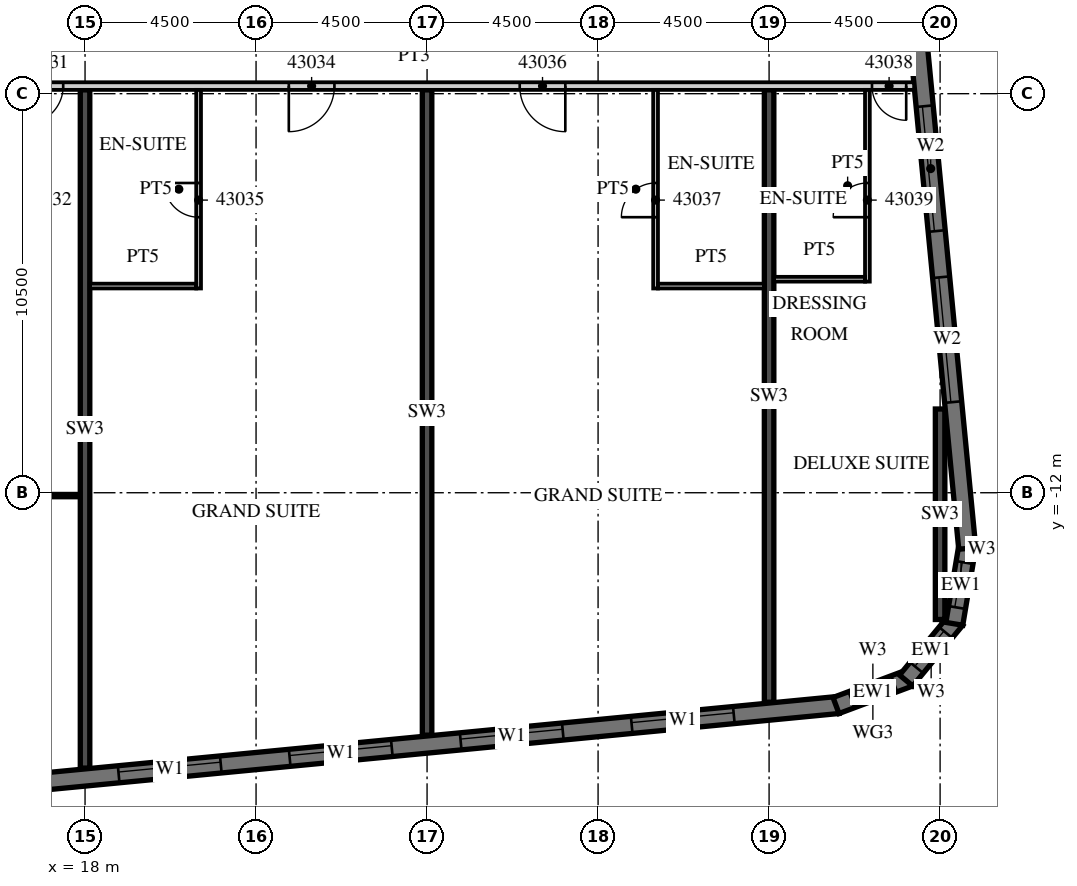
"""IFC4 building model, lengths in metres.
Left out: names, types, materials, properties, quantities, classifications, styles, units other than length and angle.
Written with IfcOpenShell. Run it as: python <this file> out.ifc"""

import sys

from ifc_helpers import new_model, si_unit, direction, frame, frame_2d, origin, place, context, subcontext, project, spatial, polyline, rectangle, outline, extrude, element, fill, save


model = new_model("IFC4")
c1 = context("Model", 3, precision=1e-05, world=origin(), true_north=direction((0.0, 1.0)))
c2 = subcontext(c1, "Body", "Model", "MODEL_VIEW")
j1 = project(units=[si_unit("LENGTHUNIT", "METRE"), si_unit("PLANEANGLEUNIT", "RADIAN")], contexts=[c1])
p1 = place(None, origin())
s1 = spatial("IfcSite", under=j1, at=p1, CompositionType="ELEMENT")
p2 = place(p1, origin())
s2 = spatial("IfcBuilding", under=s1, at=p2, CompositionType="ELEMENT")
p3 = place(p2, frame((0.0, 0.0, 183.4)))
s3 = spatial("IfcBuildingStorey", under=s2, at=p3, CompositionType="ELEMENT", Elevation=183.4)
p4 = place(p3, frame((18.0, -19.245, 0.0), z_axis=(0.0, 0.0, 1.0), x_axis=(0.0, 1.0, 0.0)))
e1 = element("IfcWall", 1, at=p4, inside=s3, PredefinedType="SHEAR", context=c2, shape_type="SweptSolid", body=[
    extrude(rectangle(XDim=17.845, YDim=0.25, at=frame_2d((8.923, 0.0))), origin(), (0.0, 0.0, 1.0), 3.3),
])
p5 = place(p3, frame((27.0, -18.379, 0.0), z_axis=(0.0, 0.0, 1.0), x_axis=(0.0, 1.0, 0.0)))
e2 = element("IfcWall", 2, at=p5, inside=s3, PredefinedType="SHEAR", context=c2, shape_type="SweptSolid", body=[
    extrude(rectangle(XDim=16.979, YDim=0.25, at=frame_2d((8.489, 0.0))), origin(), (0.0, 0.0, 1.0), 3.3),
])
p6 = place(p3, frame((36.0, -17.512, 0.0), z_axis=(0.0, 0.0, 1.0), x_axis=(0.0, 1.0, 0.0)))
e3 = element("IfcWall", 3, at=p6, inside=s3, PredefinedType="SHEAR", context=c2, shape_type="SweptSolid", body=[
    extrude(rectangle(XDim=16.112, YDim=0.25, at=frame_2d((8.056, 0.0))), origin(), (0.0, 0.0, 1.0), 3.3),
])
p7 = place(p3, frame((40.5, -15.335, 0.0), z_axis=(0.0, 0.0, 1.0), x_axis=(0.0, 1.0, 0.0)))
e4 = element("IfcWall", 4, at=p7, inside=s3, PredefinedType="SHEAR", context=c2, shape_type="SweptSolid", body=[
    extrude(rectangle(XDim=5.538, YDim=0.25, at=frame_2d((2.769, 0.0))), origin(), (0.0, 0.0, 1.0), 3.3),
])
p8 = place(p3, frame((-13.521, -22.529, 0.0), z_axis=(0.0, 0.0, 1.0), x_axis=(0.995396436651, 0.095843277819, 0.0)))
e5 = element("IfcWall", 5, at=p8, inside=s3, PredefinedType="SOLIDWALL", context=c2, shape_type="SweptSolid", body=[
    extrude(rectangle(XDim=51.578, YDim=0.45, at=frame_2d((25.789, 0.0))), origin(), (0.0, 0.0, 1.0), 3.02),
])
p9 = place(p8, frame((0.91, 0.0, 0.45)))
e6 = element("IfcOpeningElement", 6, at=p9, cuts=e5, PredefinedType="OPENING", context=c2, shape_type="SweptSolid", body=[
    extrude(rectangle(XDim=2.7, YDim=2.25, at=frame_2d((1.35, 1.125))), frame((0.0, 0.235, 0.0), z_axis=(0.0, -1.0, 0.0), x_axis=(1.0, 0.0, 0.0)), (0.0, 0.0, 1.0), 0.47),
])
p10 = place(p8, frame((5.431, 0.0, 0.45)))
e7 = element("IfcOpeningElement", 7, at=p10, cuts=e5, PredefinedType="OPENING", context=c2, shape_type="SweptSolid", body=[
    extrude(rectangle(XDim=2.7, YDim=2.25, at=frame_2d((1.35, 1.125))), frame((0.0, 0.235, 0.0), z_axis=(0.0, -1.0, 0.0), x_axis=(1.0, 0.0, 0.0)), (0.0, 0.0, 1.0), 0.47),
])
p11 = place(p8, frame((9.952, 0.0, 0.45)))
e8 = element("IfcOpeningElement", 8, at=p11, cuts=e5, PredefinedType="OPENING", context=c2, shape_type="SweptSolid", body=[
    extrude(rectangle(XDim=2.7, YDim=2.25, at=frame_2d((1.35, 1.125))), frame((0.0, 0.235, 0.0), z_axis=(0.0, -1.0, 0.0), x_axis=(1.0, 0.0, 0.0)), (0.0, 0.0, 1.0), 0.47),
])
p12 = place(p8, frame((14.473, 0.0, 0.45)))
e9 = element("IfcOpeningElement", 9, at=p12, cuts=e5, PredefinedType="OPENING", context=c2, shape_type="SweptSolid", body=[
    extrude(rectangle(XDim=2.7, YDim=2.25, at=frame_2d((1.35, 1.125))), frame((0.0, 0.235, 0.0), z_axis=(0.0, -1.0, 0.0), x_axis=(1.0, 0.0, 0.0)), (0.0, 0.0, 1.0), 0.47),
])
p13 = place(p8, frame((18.994, 0.0, 0.45)))
e10 = element("IfcOpeningElement", 10, at=p13, cuts=e5, PredefinedType="OPENING", context=c2, shape_type="SweptSolid", body=[
    extrude(rectangle(XDim=2.7, YDim=2.25, at=frame_2d((1.35, 1.125))), frame((0.0, 0.235, 0.0), z_axis=(0.0, -1.0, 0.0), x_axis=(1.0, 0.0, 0.0)), (0.0, 0.0, 1.0), 0.47),
])
p14 = place(p8, frame((23.514, 0.0, 0.45)))
e11 = element("IfcOpeningElement", 11, at=p14, cuts=e5, PredefinedType="OPENING", context=c2, shape_type="SweptSolid", body=[
    extrude(rectangle(XDim=2.7, YDim=2.25, at=frame_2d((1.35, 1.125))), frame((0.0, 0.235, 0.0), z_axis=(0.0, -1.0, 0.0), x_axis=(1.0, 0.0, 0.0)), (0.0, 0.0, 1.0), 0.47),
])
p15 = place(p8, frame((28.035, 0.0, 0.45)))
e12 = element("IfcOpeningElement", 12, at=p15, cuts=e5, PredefinedType="OPENING", context=c2, shape_type="SweptSolid", body=[
    extrude(rectangle(XDim=2.7, YDim=2.25, at=frame_2d((1.35, 1.125))), frame((0.0, 0.235, 0.0), z_axis=(0.0, -1.0, 0.0), x_axis=(1.0, 0.0, 0.0)), (0.0, 0.0, 1.0), 0.47),
])
p16 = place(p8, frame((32.556, 0.0, 0.45)))
e13 = element("IfcOpeningElement", 13, at=p16, cuts=e5, PredefinedType="OPENING", context=c2, shape_type="SweptSolid", body=[
    extrude(rectangle(XDim=2.7, YDim=2.25, at=frame_2d((1.35, 1.125))), frame((0.0, 0.235, 0.0), z_axis=(0.0, -1.0, 0.0), x_axis=(1.0, 0.0, 0.0)), (0.0, 0.0, 1.0), 0.47),
])
p17 = place(p8, frame((37.077, 0.0, 0.45)))
e14 = element("IfcOpeningElement", 14, at=p17, cuts=e5, PredefinedType="OPENING", context=c2, shape_type="SweptSolid", body=[
    extrude(rectangle(XDim=2.7, YDim=2.25, at=frame_2d((1.35, 1.125))), frame((0.0, 0.235, 0.0), z_axis=(0.0, -1.0, 0.0), x_axis=(1.0, 0.0, 0.0)), (0.0, 0.0, 1.0), 0.47),
])
p18 = place(p8, frame((41.598, 0.0, 0.45)))
e15 = element("IfcOpeningElement", 15, at=p18, cuts=e5, PredefinedType="OPENING", context=c2, shape_type="SweptSolid", body=[
    extrude(rectangle(XDim=2.7, YDim=2.25, at=frame_2d((1.35, 1.125))), frame((0.0, 0.235, 0.0), z_axis=(0.0, -1.0, 0.0), x_axis=(1.0, 0.0, 0.0)), (0.0, 0.0, 1.0), 0.47),
])
p19 = place(p8, frame((46.119, 0.0, 0.45)))
e16 = element("IfcOpeningElement", 16, at=p19, cuts=e5, PredefinedType="OPENING", context=c2, shape_type="SweptSolid", body=[
    extrude(rectangle(XDim=2.7, YDim=2.25, at=frame_2d((1.35, 1.125))), frame((0.0, 0.235, 0.0), z_axis=(0.0, -1.0, 0.0), x_axis=(1.0, 0.0, 0.0)), (0.0, 0.0, 1.0), 0.47),
])
p20 = place(p3, frame((37.761, -17.598, 0.0), z_axis=(0.0, 0.0, 1.0), x_axis=(0.936677599948, 0.350192909346, 0.0)))
e17 = element("IfcWall", 17, at=p20, inside=s3, PredefinedType="SOLIDWALL", context=c2, shape_type="SweptSolid", body=[
    extrude(outline(polyline([(0.0, -0.225), (2.071, -0.225), (1.95, 0.225), (0.121, 0.225), (0.0, -0.225)])), origin(), (0.0, 0.0, 1.0), 3.02),
])
p21 = place(p20, frame((0.435, 0.0, 0.45)))
e18 = element("IfcOpeningElement", 18, at=p21, cuts=e17, PredefinedType="OPENING", context=c2, shape_type="SweptSolid", body=[
    extrude(rectangle(XDim=1.2, YDim=2.25, at=frame_2d((0.6, 1.125))), frame((0.0, 0.235, 0.0), z_axis=(0.0, -1.0, 0.0), x_axis=(1.0, 0.0, 0.0)), (0.0, 0.0, 1.0), 0.47),
])
p22 = place(p3, frame((39.606, -16.941, 0.0), z_axis=(0.0, 0.0, 1.0), x_axis=(0.636116318187, 0.771593176315, 0.0)))
e19 = element("IfcWall", 19, at=p22, inside=s3, PredefinedType="SOLIDWALL", context=c2, shape_type="SweptSolid", body=[
    extrude(outline(polyline([(0.0, -0.225), (2.071, -0.225), (1.95, 0.225), (0.121, 0.225), (0.0, -0.225)])), origin(), (0.0, 0.0, 1.0), 3.02),
])
p23 = place(p22, frame((0.435, 0.0, 0.45)))
e20 = element("IfcOpeningElement", 20, at=p23, cuts=e19, PredefinedType="OPENING", context=c2, shape_type="SweptSolid", body=[
    extrude(rectangle(XDim=1.2, YDim=2.25, at=frame_2d((0.6, 1.125))), frame((0.0, 0.235, 0.0), z_axis=(0.0, -1.0, 0.0), x_axis=(1.0, 0.0, 0.0)), (0.0, 0.0, 1.0), 0.47),
])
p24 = place(p3, frame((40.875, -15.449, 0.0), z_axis=(0.0, 0.0, 1.0), x_axis=(0.164953448126, 0.986301353518, 0.0)))
e21 = element("IfcWall", 21, at=p24, inside=s3, PredefinedType="SOLIDWALL", context=c2, shape_type="SweptSolid", body=[
    extrude(outline(polyline([(0.0, -0.225), (2.071, -0.225), (1.95, 0.225), (0.121, 0.225), (0.0, -0.225)])), origin(), (0.0, 0.0, 1.0), 3.02),
])
p25 = place(p24, frame((0.435, 0.0, 0.45)))
e22 = element("IfcOpeningElement", 22, at=p25, cuts=e21, PredefinedType="OPENING", context=c2, shape_type="SweptSolid", body=[
    extrude(rectangle(XDim=1.2, YDim=2.25, at=frame_2d((0.6, 1.125))), frame((0.0, 0.235, 0.0), z_axis=(0.0, -1.0, 0.0), x_axis=(1.0, 0.0, 0.0)), (0.0, 0.0, 1.0), 0.47),
])
p26 = place(p3, frame((41.214, -13.466, 0.0), z_axis=(0.0, 0.0, 1.0), x_axis=(-0.095847314626, 0.995396047952, 0.0)))
e23 = element("IfcWall", 23, at=p26, inside=s3, PredefinedType="SOLIDWALL", context=c2, shape_type="SweptSolid", body=[
    extrude(rectangle(XDim=34.0, YDim=0.45, at=frame_2d((17.0, 0.0))), origin(), (0.0, 0.0, 1.0), 3.02),
])
p27 = place(p26, frame((3.869, 0.0, 0.45)))
e24 = element("IfcOpeningElement", 24, at=p27, cuts=e23, PredefinedType="OPENING", context=c2, shape_type="SweptSolid", body=[
    extrude(rectangle(XDim=3.3, YDim=2.25, at=frame_2d((1.65, 1.125))), frame((0.0, 0.235, 0.0), z_axis=(0.0, -1.0, 0.0), x_axis=(1.0, 0.0, 0.0)), (0.0, 0.0, 1.0), 0.47),
])
p28 = place(p26, frame((8.39, 0.0, 0.45)))
e25 = element("IfcOpeningElement", 25, at=p28, cuts=e23, PredefinedType="OPENING", context=c2, shape_type="SweptSolid", body=[
    extrude(rectangle(XDim=3.3, YDim=2.25, at=frame_2d((1.65, 1.125))), frame((0.0, 0.235, 0.0), z_axis=(0.0, -1.0, 0.0), x_axis=(1.0, 0.0, 0.0)), (0.0, 0.0, 1.0), 0.47),
])
p29 = place(p3, frame((13.5, -1.3, 0.0), z_axis=(0.0, 0.0, 1.0), x_axis=(1.0, 0.0, 0.0)))
e26 = element("IfcWall", 26, at=p29, inside=s3, PredefinedType="PARTITIONING", context=c2, shape_type="SweptSolid", body=[
    extrude(rectangle(XDim=26.317, YDim=0.2, at=frame_2d((13.158, 0.0))), origin(), (0.0, 0.0, 1.0), 3.02),
])
p30 = place(p29, frame((2.925, 0.0, 0.0)))
e27 = element("IfcOpeningElement", 27, at=p30, cuts=e26, PredefinedType="OPENING", context=c2, shape_type="SweptSolid", body=[
    extrude(rectangle(XDim=1.0, YDim=2.1, at=frame_2d((0.5, 1.05))), frame((0.0, 0.11, 0.0), z_axis=(0.0, -1.0, 0.0), x_axis=(1.0, 0.0, 0.0)), (0.0, 0.0, 1.0), 0.22),
])
p31 = place(p29, frame((9.862, 0.0, 0.0)))
e28 = element("IfcOpeningElement", 28, at=p31, cuts=e26, PredefinedType="OPENING", context=c2, shape_type="SweptSolid", body=[
    extrude(rectangle(XDim=1.2, YDim=2.1, at=frame_2d((0.6, 1.05))), frame((0.0, 0.11, 0.0), z_axis=(0.0, -1.0, 0.0), x_axis=(1.0, 0.0, 0.0)), (0.0, 0.0, 1.0), 0.22),
])
p32 = place(p29, frame((15.938, 0.0, 0.0)))
e29 = element("IfcOpeningElement", 29, at=p32, cuts=e26, PredefinedType="OPENING", context=c2, shape_type="SweptSolid", body=[
    extrude(rectangle(XDim=1.2, YDim=2.1, at=frame_2d((0.6, 1.05))), frame((0.0, 0.11, 0.0), z_axis=(0.0, -1.0, 0.0), x_axis=(1.0, 0.0, 0.0)), (0.0, 0.0, 1.0), 0.22),
])
p33 = place(p29, frame((25.208, 0.0, 0.0)))
e30 = element("IfcOpeningElement", 30, at=p33, cuts=e26, PredefinedType="OPENING", context=c2, shape_type="SweptSolid", body=[
    extrude(rectangle(XDim=0.9, YDim=2.1, at=frame_2d((0.45, 1.05))), frame((0.0, 0.11, 0.0), z_axis=(0.0, -1.0, 0.0), x_axis=(1.0, 0.0, 0.0)), (0.0, 0.0, 1.0), 0.22),
])
p34 = place(p3, frame((13.6, -12.075, 0.0), z_axis=(0.0, 0.0, 1.0), x_axis=(1.0, 0.0, 0.0)))
e31 = element("IfcWall", 31, at=p34, inside=s3, PredefinedType="PARTITIONING", context=c2, shape_type="SweptSolid", body=[
    extrude(rectangle(XDim=4.275, YDim=0.1, at=frame_2d((2.137, 0.0))), origin(), (0.0, 0.0, 1.0), 3.02),
])
p35 = place(p34, frame((1.388, 0.0, 0.0)))
e32 = element("IfcOpeningElement", 32, at=p35, cuts=e31, PredefinedType="OPENING", context=c2, shape_type="SweptSolid", body=[
    extrude(rectangle(XDim=1.5, YDim=2.1, at=frame_2d((0.75, 1.05))), frame((0.0, 0.06, 0.0), z_axis=(0.0, -1.0, 0.0), x_axis=(1.0, 0.0, 0.0)), (0.0, 0.0, 1.0), 0.12),
])
p36 = place(p3, frame((20.988, -6.625, 0.0), z_axis=(0.0, 0.0, 1.0), x_axis=(0.0, 1.0, 0.0)))
e33 = element("IfcWall", 33, at=p36, inside=s3, PredefinedType="PARTITIONING", context=c2, shape_type="SweptSolid", body=[
    extrude(rectangle(XDim=5.225, YDim=0.125, at=frame_2d((2.613, 0.0))), origin(), (0.0, 0.0, 1.0), 3.02),
])
p37 = place(p36, frame((1.875, 0.0, 0.0)))
e34 = element("IfcOpeningElement", 34, at=p37, cuts=e33, PredefinedType="OPENING", context=c2, shape_type="SweptSolid", body=[
    extrude(rectangle(XDim=0.9, YDim=2.1, at=frame_2d((0.45, 1.05))), frame((0.0, 0.073, 0.0), z_axis=(0.0, -1.0, 0.0), x_axis=(1.0, 0.0, 0.0)), (0.0, 0.0, 1.0), 0.145),
])
p38 = place(p3, frame((18.125, -6.562, 0.0), z_axis=(0.0, 0.0, 1.0), x_axis=(1.0, 0.0, 0.0)))
e35 = element("IfcWall", 35, at=p38, inside=s3, PredefinedType="PARTITIONING", context=c2, shape_type="SweptSolid", body=[
    extrude(rectangle(XDim=2.8, YDim=0.125, at=frame_2d((1.4, 0.0))), origin(), (0.0, 0.0, 1.0), 3.02),
])
p39 = place(p3, frame((33.013, -6.625, 0.0), z_axis=(0.0, 0.0, 1.0), x_axis=(0.0, 1.0, 0.0)))
e36 = element("IfcWall", 36, at=p39, inside=s3, PredefinedType="PARTITIONING", context=c2, shape_type="SweptSolid", body=[
    extrude(rectangle(XDim=5.225, YDim=0.125, at=frame_2d((2.613, 0.0))), origin(), (0.0, 0.0, 1.0), 3.02),
])
p40 = place(p39, frame((1.875, 0.0, 0.0)))
e37 = element("IfcOpeningElement", 37, at=p40, cuts=e36, PredefinedType="OPENING", context=c2, shape_type="SweptSolid", body=[
    extrude(rectangle(XDim=0.9, YDim=2.1, at=frame_2d((0.45, 1.05))), frame((0.0, 0.073, 0.0), z_axis=(0.0, -1.0, 0.0), x_axis=(1.0, 0.0, 0.0)), (0.0, 0.0, 1.0), 0.145),
])
p41 = place(p3, frame((33.075, -6.562, 0.0), z_axis=(0.0, 0.0, 1.0), x_axis=(1.0, 0.0, 0.0)))
e38 = element("IfcWall", 38, at=p41, inside=s3, PredefinedType="PARTITIONING", context=c2, shape_type="SweptSolid", body=[
    extrude(rectangle(XDim=2.8, YDim=0.125, at=frame_2d((1.4, 0.0))), origin(), (0.0, 0.0, 1.0), 3.02),
])
p42 = place(p3, frame((38.587, -6.445, 0.0), z_axis=(0.0, 0.0, 1.0), x_axis=(0.0, 1.0, 0.0)))
e39 = element("IfcWall", 39, at=p42, inside=s3, PredefinedType="PARTITIONING", context=c2, shape_type="SweptSolid", body=[
    extrude(rectangle(XDim=5.045, YDim=0.125, at=frame_2d((2.522, 0.0))), origin(), (0.0, 0.0, 1.0), 3.02),
])
p43 = place(p42, frame((1.695, 0.0, 0.0)))
e40 = element("IfcOpeningElement", 40, at=p43, cuts=e39, PredefinedType="OPENING", context=c2, shape_type="SweptSolid", body=[
    extrude(rectangle(XDim=0.9, YDim=2.1, at=frame_2d((0.45, 1.05))), frame((0.0, 0.073, 0.0), z_axis=(0.0, -1.0, 0.0), x_axis=(1.0, 0.0, 0.0)), (0.0, 0.0, 1.0), 0.145),
])
p44 = place(p3, frame((36.125, -6.382, 0.0), z_axis=(0.0, 0.0, 1.0), x_axis=(1.0, 0.0, 0.0)))
e41 = element("IfcWall", 41, at=p44, inside=s3, PredefinedType="PARTITIONING", context=c2, shape_type="SweptSolid", body=[
    extrude(rectangle(XDim=2.4, YDim=0.125, at=frame_2d((1.2, 0.0))), origin(), (0.0, 0.0, 1.0), 3.02),
])
p45 = place(p16, origin())
e42 = element("IfcWindow", 42, at=p45, inside=s3, PartitioningType="SINGLE_PANEL", PredefinedType="WINDOW", context=c2, shape_type="SweptSolid", body=[
    extrude(rectangle(XDim=2.7, YDim=2.25, at=frame_2d((1.35, 1.125))), frame((0.0, 0.09, 0.0), z_axis=(0.0, -1.0, 0.0), x_axis=(1.0, 0.0, 0.0)), (0.0, 0.0, 1.0), 0.06),
])
fill(e13, e42)
p46 = place(p17, origin())
e43 = element("IfcWindow", 43, at=p46, inside=s3, PartitioningType="SINGLE_PANEL", PredefinedType="WINDOW", context=c2, shape_type="SweptSolid", body=[
    extrude(rectangle(XDim=2.7, YDim=2.25, at=frame_2d((1.35, 1.125))), frame((0.0, 0.09, 0.0), z_axis=(0.0, -1.0, 0.0), x_axis=(1.0, 0.0, 0.0)), (0.0, 0.0, 1.0), 0.06),
])
fill(e14, e43)
p47 = place(p18, origin())
e44 = element("IfcWindow", 44, at=p47, inside=s3, PartitioningType="SINGLE_PANEL", PredefinedType="WINDOW", context=c2, shape_type="SweptSolid", body=[
    extrude(rectangle(XDim=2.7, YDim=2.25, at=frame_2d((1.35, 1.125))), frame((0.0, 0.09, 0.0), z_axis=(0.0, -1.0, 0.0), x_axis=(1.0, 0.0, 0.0)), (0.0, 0.0, 1.0), 0.06),
])
fill(e15, e44)
p48 = place(p19, origin())
e45 = element("IfcWindow", 45, at=p48, inside=s3, PartitioningType="SINGLE_PANEL", PredefinedType="WINDOW", context=c2, shape_type="SweptSolid", body=[
    extrude(rectangle(XDim=2.7, YDim=2.25, at=frame_2d((1.35, 1.125))), frame((0.0, 0.09, 0.0), z_axis=(0.0, -1.0, 0.0), x_axis=(1.0, 0.0, 0.0)), (0.0, 0.0, 1.0), 0.06),
])
fill(e16, e45)
p49 = place(p21, origin())
e46 = element("IfcWindow", 46, at=p49, inside=s3, PartitioningType="SINGLE_PANEL", PredefinedType="WINDOW", context=c2, shape_type="SweptSolid", body=[
    extrude(rectangle(XDim=1.2, YDim=2.25, at=frame_2d((0.6, 1.125))), frame((0.0, 0.09, 0.0), z_axis=(0.0, -1.0, 0.0), x_axis=(1.0, 0.0, 0.0)), (0.0, 0.0, 1.0), 0.06),
])
fill(e18, e46)
p50 = place(p23, origin())
e47 = element("IfcWindow", 47, at=p50, inside=s3, PartitioningType="SINGLE_PANEL", PredefinedType="WINDOW", context=c2, shape_type="SweptSolid", body=[
    extrude(rectangle(XDim=1.2, YDim=2.25, at=frame_2d((0.6, 1.125))), frame((0.0, 0.09, 0.0), z_axis=(0.0, -1.0, 0.0), x_axis=(1.0, 0.0, 0.0)), (0.0, 0.0, 1.0), 0.06),
])
fill(e20, e47)
p51 = place(p25, origin())
e48 = element("IfcWindow", 48, at=p51, inside=s3, PartitioningType="SINGLE_PANEL", PredefinedType="WINDOW", context=c2, shape_type="SweptSolid", body=[
    extrude(rectangle(XDim=1.2, YDim=2.25, at=frame_2d((0.6, 1.125))), frame((0.0, 0.09, 0.0), z_axis=(0.0, -1.0, 0.0), x_axis=(1.0, 0.0, 0.0)), (0.0, 0.0, 1.0), 0.06),
])
fill(e22, e48)
p52 = place(p27, origin())
e49 = element("IfcWindow", 49, at=p52, inside=s3, PartitioningType="SINGLE_PANEL", PredefinedType="WINDOW", context=c2, shape_type="SweptSolid", body=[
    extrude(rectangle(XDim=3.3, YDim=2.25, at=frame_2d((1.65, 1.125))), frame((0.0, 0.09, 0.0), z_axis=(0.0, -1.0, 0.0), x_axis=(1.0, 0.0, 0.0)), (0.0, 0.0, 1.0), 0.06),
])
fill(e24, e49)
p53 = place(p28, origin())
e50 = element("IfcWindow", 50, at=p53, inside=s3, PartitioningType="SINGLE_PANEL", PredefinedType="WINDOW", context=c2, shape_type="SweptSolid", body=[
    extrude(rectangle(XDim=3.3, YDim=2.25, at=frame_2d((1.65, 1.125))), frame((0.0, 0.09, 0.0), z_axis=(0.0, -1.0, 0.0), x_axis=(1.0, 0.0, 0.0)), (0.0, 0.0, 1.0), 0.06),
])
fill(e25, e50)
p54 = place(p30, origin())
e51 = element("IfcDoor", 51, at=p54, inside=s3, OperationType="SINGLE_SWING_LEFT", PredefinedType="DOOR", context=c2, shape_type="SweptSolid", body=[
    extrude(rectangle(XDim=1.0, YDim=2.1, at=frame_2d((0.5, 1.05))), frame((0.0, 0.025, 0.0), z_axis=(0.0, -1.0, 0.0), x_axis=(1.0, 0.0, 0.0)), (0.0, 0.0, 1.0), 0.05),
])
fill(e27, e51)
p55 = place(p31, origin())
e52 = element("IfcDoor", 52, at=p55, inside=s3, OperationType="SINGLE_SWING_LEFT", PredefinedType="DOOR", context=c2, shape_type="SweptSolid", body=[
    extrude(rectangle(XDim=1.2, YDim=2.1, at=frame_2d((0.6, 1.05))), frame((0.0, 0.025, 0.0), z_axis=(0.0, -1.0, 0.0), x_axis=(1.0, 0.0, 0.0)), (0.0, 0.0, 1.0), 0.05),
])
fill(e28, e52)
p56 = place(p37, origin())
e53 = element("IfcDoor", 53, at=p56, inside=s3, OperationType="SINGLE_SWING_RIGHT", PredefinedType="DOOR", context=c2, shape_type="SweptSolid", body=[
    extrude(rectangle(XDim=0.9, YDim=2.1, at=frame_2d((0.45, 1.05))), frame((0.0, 0.025, 0.0), z_axis=(0.0, -1.0, 0.0), x_axis=(1.0, 0.0, 0.0)), (0.0, 0.0, 1.0), 0.05),
])
fill(e34, e53)
p57 = place(p32, origin())
e54 = element("IfcDoor", 54, at=p57, inside=s3, OperationType="SINGLE_SWING_RIGHT", PredefinedType="DOOR", context=c2, shape_type="SweptSolid", body=[
    extrude(rectangle(XDim=1.2, YDim=2.1, at=frame_2d((0.6, 1.05))), frame((0.0, 0.025, 0.0), z_axis=(0.0, -1.0, 0.0), x_axis=(1.0, 0.0, 0.0)), (0.0, 0.0, 1.0), 0.05),
])
fill(e29, e54)
p58 = place(p40, origin())
e55 = element("IfcDoor", 55, at=p58, inside=s3, OperationType="SINGLE_SWING_LEFT", PredefinedType="DOOR", context=c2, shape_type="SweptSolid", body=[
    extrude(rectangle(XDim=0.9, YDim=2.1, at=frame_2d((0.45, 1.05))), frame((0.0, 0.025, 0.0), z_axis=(0.0, -1.0, 0.0), x_axis=(1.0, 0.0, 0.0)), (0.0, 0.0, 1.0), 0.05),
])
fill(e37, e55)
p59 = place(p33, origin())
e56 = element("IfcDoor", 56, at=p59, inside=s3, OperationType="SINGLE_SWING_RIGHT", PredefinedType="DOOR", context=c2, shape_type="SweptSolid", body=[
    extrude(rectangle(XDim=0.9, YDim=2.1, at=frame_2d((0.45, 1.05))), frame((0.0, 0.025, 0.0), z_axis=(0.0, -1.0, 0.0), x_axis=(1.0, 0.0, 0.0)), (0.0, 0.0, 1.0), 0.05),
])
fill(e30, e56)
p60 = place(p43, origin())
e57 = element("IfcDoor", 57, at=p60, inside=s3, OperationType="SINGLE_SWING_LEFT", PredefinedType="DOOR", context=c2, shape_type="SweptSolid", body=[
    extrude(rectangle(XDim=0.9, YDim=2.1, at=frame_2d((0.45, 1.05))), frame((0.0, 0.025, 0.0), z_axis=(0.0, -1.0, 0.0), x_axis=(1.0, 0.0, 0.0)), (0.0, 0.0, 1.0), 0.05),
])
fill(e40, e57)
save(model, sys.argv[1])
